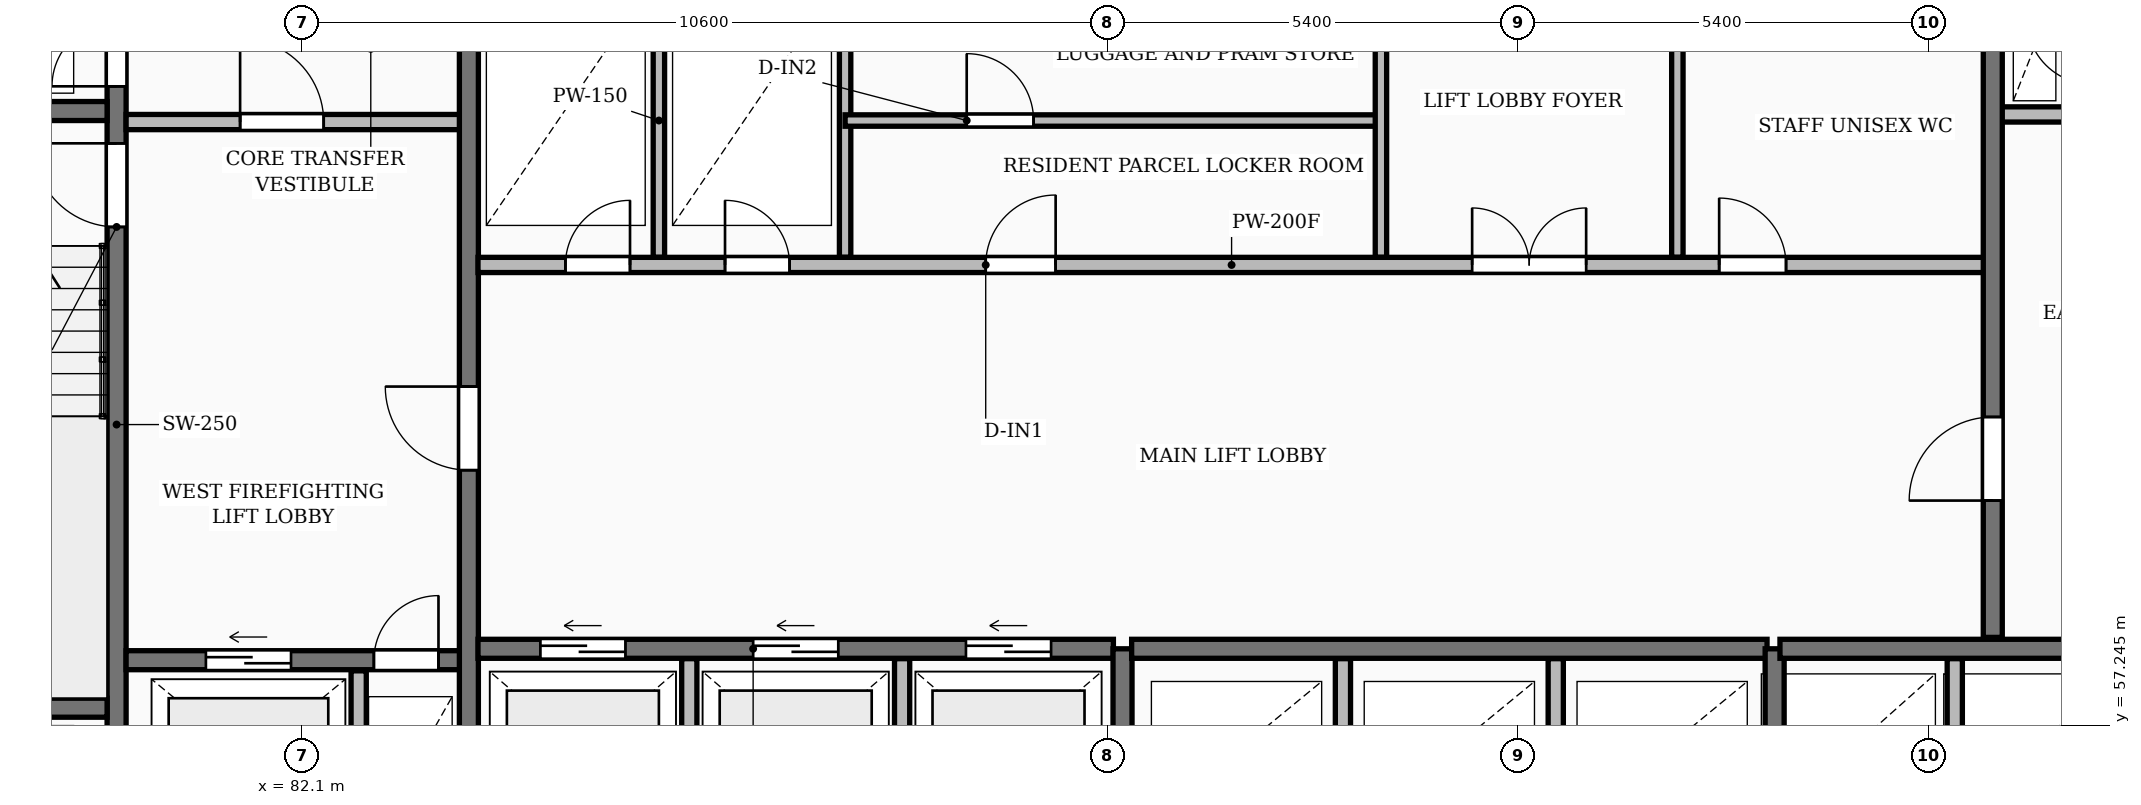
"""IFC4 building model, lengths in metres.
Left out: names, types, materials, properties, quantities, classifications, styles, units other than length and angle.
Written with IfcOpenShell. Run it as: python <this file> out.ifc"""

import sys

from ifc_helpers import new_model, si_unit, direction, frame, frame_2d, origin, place, context, subcontext, project, spatial, rectangle, extrude, element, fill, save


model = new_model("IFC4")
c1 = context("Model", 3, precision=1e-05, world=origin(), true_north=direction((0.0, 1.0)))
c2 = subcontext(c1, "Body", "Model", "MODEL_VIEW")
j1 = project(units=[si_unit("LENGTHUNIT", "METRE"), si_unit("PLANEANGLEUNIT", "RADIAN")], contexts=[c1])
p1 = place(None, origin())
s1 = spatial("IfcSite", under=j1, at=p1, CompositionType="ELEMENT")
p2 = place(p1, origin())
s2 = spatial("IfcBuilding", under=s1, at=p2, CompositionType="ELEMENT")
p3 = place(p2, frame((0.0, 0.0, 84.05)))
s3 = spatial("IfcBuildingStorey", under=s2, at=p3, CompositionType="ELEMENT", Elevation=84.05)
p4 = place(p3, frame((79.665, 55.4, 0.0), z_axis=(0.0, 0.0, 1.0), x_axis=(0.0, 1.0, 0.0)))
e1 = element("IfcWall", 1, at=p4, inside=s3, PredefinedType="SHEAR", context=c2, shape_type="SweptSolid", body=[
    extrude(rectangle(XDim=11.6, YDim=0.25, at=frame_2d((5.8, 0.0))), origin(), (0.0, 0.0, 1.0), 3.25),
])
p5 = place(p4, frame((0.55, 0.0, 0.0)))
e2 = element("IfcOpeningElement", 2, at=p5, cuts=e1, PredefinedType="OPENING", context=c2, shape_type="SweptSolid", body=[
    extrude(rectangle(XDim=0.85, YDim=2.05, at=frame_2d((0.425, 1.025))), frame((0.0, 0.135, 0.0), z_axis=(0.0, -1.0, 0.0), x_axis=(1.0, 0.0, 0.0)), (0.0, 0.0, 1.0), 0.27),
])
p6 = place(p4, frame((8.4, 0.0, 0.0)))
e3 = element("IfcOpeningElement", 3, at=p6, cuts=e1, PredefinedType="OPENING", context=c2, shape_type="SweptSolid", body=[
    extrude(rectangle(XDim=1.1, YDim=2.1, at=frame_2d((0.55, 1.05))), frame((0.0, 0.135, 0.0), z_axis=(0.0, -1.0, 0.0), x_axis=(1.0, 0.0, 0.0)), (0.0, 0.0, 1.0), 0.27),
])
p7 = place(p4, frame((10.25, 0.0, 0.0)))
e4 = element("IfcOpeningElement", 4, at=p7, cuts=e1, PredefinedType="OPENING", context=c2, shape_type="SweptSolid", body=[
    extrude(rectangle(XDim=0.85, YDim=2.05, at=frame_2d((0.425, 1.025))), frame((0.0, 0.135, 0.0), z_axis=(0.0, -1.0, 0.0), x_axis=(1.0, 0.0, 0.0)), (0.0, 0.0, 1.0), 0.27),
])
for number, where, z_axis, x_axis in (
    (5, (76.3, 57.475, 0.0), (0.0, 0.0, 1.0), (1.0, 0.0, 0.0)),
    (6, (76.3, 65.325, 0.0), (0.0, 0.0, 1.0), (1.0, 0.0, 0.0)),
):
    element("IfcWall", number, at=place(p3, frame(where, z_axis=z_axis, x_axis=x_axis)), inside=s3, PredefinedType="SHEAR", context=c2, shape_type="SweptSolid", body=[
        extrude(rectangle(XDim=3.24, YDim=0.25, at=frame_2d((1.62, 0.0))), origin(), (0.0, 0.0, 1.0), 3.25),
    ])
p8 = place(p3, frame((79.79, 58.1, 0.0), z_axis=(0.0, 0.0, 1.0), x_axis=(1.0, 0.0, 0.0)))
e7 = element("IfcWall", 7, at=p8, inside=s3, PredefinedType="SHEAR", context=c2, shape_type="SweptSolid", body=[
    extrude(rectangle(XDim=4.39, YDim=0.25, at=frame_2d((2.195, 0.0))), origin(), (0.0, 0.0, 1.0), 3.25),
])
p9 = place(p8, frame((1.05, 0.0, 0.0)))
e8 = element("IfcOpeningElement", 8, at=p9, cuts=e7, PredefinedType="OPENING", context=c2, shape_type="SweptSolid", body=[
    extrude(rectangle(XDim=1.12, YDim=2.12, at=frame_2d((0.56, 1.06))), frame((0.0, 0.135, 0.0), z_axis=(0.0, -1.0, 0.0), x_axis=(1.0, 0.0, 0.0)), (0.0, 0.0, 1.0), 0.27),
])
p10 = place(p8, frame((3.26, 0.0, 0.0)))
e9 = element("IfcOpeningElement", 9, at=p10, cuts=e7, PredefinedType="OPENING", context=c2, shape_type="SweptSolid", body=[
    extrude(rectangle(XDim=0.85, YDim=2.05, at=frame_2d((0.425, 1.025))), frame((0.0, 0.135, 0.0), z_axis=(0.0, -1.0, 0.0), x_axis=(1.0, 0.0, 0.0)), (0.0, 0.0, 1.0), 0.27),
])
p11 = place(p3, frame((82.85, 55.4, 0.0), z_axis=(0.0, 0.0, 1.0), x_axis=(0.0, 1.0, 0.0)))
e10 = element("IfcWall", 10, at=p11, inside=s3, PredefinedType="PARTITIONING", context=c2, shape_type="SweptSolid", body=[
    extrude(rectangle(XDim=2.56, YDim=0.2, at=frame_2d((1.28, 0.0))), origin(), (0.0, 0.0, 1.0), 2.97),
])
p12 = place(p3, frame((79.79, 65.18, 0.0), z_axis=(0.0, 0.0, 1.0), x_axis=(1.0, 0.0, 0.0)))
e11 = element("IfcWall", 11, at=p12, inside=s3, PredefinedType="PARTITIONING", context=c2, shape_type="SweptSolid", body=[
    extrude(rectangle(XDim=4.39, YDim=0.2, at=frame_2d((2.195, 0.0))), origin(), (0.0, 0.0, 1.0), 2.97),
])
p13 = place(p12, frame((1.5, 0.0, 0.0)))
e12 = element("IfcOpeningElement", 12, at=p13, cuts=e11, PredefinedType="OPENING", context=c2, shape_type="SweptSolid", body=[
    extrude(rectangle(XDim=1.1, YDim=2.1, at=frame_2d((0.55, 1.05))), frame((0.0, 0.11, 0.0), z_axis=(0.0, -1.0, 0.0), x_axis=(1.0, 0.0, 0.0)), (0.0, 0.0, 1.0), 0.22),
])
p14 = place(p3, frame((84.3, 55.4, 0.0), z_axis=(0.0, 0.0, 1.0), x_axis=(0.0, 1.0, 0.0)))
e13 = element("IfcWall", 13, at=p14, inside=s3, PredefinedType="SHEAR", context=c2, shape_type="SweptSolid", body=[
    extrude(rectangle(XDim=11.6, YDim=0.25, at=frame_2d((5.8, 0.0))), origin(), (0.0, 0.0, 1.0), 3.25),
])
p15 = place(p14, frame((5.2, 0.0, 0.0)))
e14 = element("IfcOpeningElement", 14, at=p15, cuts=e13, PredefinedType="OPENING", context=c2, shape_type="SweptSolid", body=[
    extrude(rectangle(XDim=1.1, YDim=2.1, at=frame_2d((0.55, 1.05))), frame((0.0, 0.135, 0.0), z_axis=(0.0, -1.0, 0.0), x_axis=(1.0, 0.0, 0.0)), (0.0, 0.0, 1.0), 0.27),
])
for number, where, z_axis, x_axis in (
    (15, (87.2, 55.4, 0.0), (0.0, 0.0, 1.0), (0.0, 1.0, 0.0)),
    (16, (90.0, 55.4, 0.0), (0.0, 0.0, 1.0), (0.0, 1.0, 0.0)),
):
    element("IfcWall", number, at=place(p3, frame(where, z_axis=z_axis, x_axis=x_axis)), inside=s3, PredefinedType="PARTITIONING", context=c2, shape_type="SweptSolid", body=[
        extrude(rectangle(XDim=2.72, YDim=0.2, at=frame_2d((1.36, 0.0))), origin(), (0.0, 0.0, 1.0), 2.97),
    ])
p16 = place(p3, frame((84.42, 58.25, 0.0), z_axis=(0.0, 0.0, 1.0), x_axis=(1.0, 0.0, 0.0)))
e17 = element("IfcWall", 17, at=p16, inside=s3, PredefinedType="SHEAR", context=c2, shape_type="SweptSolid", body=[
    extrude(rectangle(XDim=8.36, YDim=0.25, at=frame_2d((4.18, 0.0))), origin(), (0.0, 0.0, 1.0), 3.25),
])
p17 = place(p16, frame((0.82, 0.0, 0.0)))
e18 = element("IfcOpeningElement", 18, at=p17, cuts=e17, PredefinedType="OPENING", context=c2, shape_type="SweptSolid", body=[
    extrude(rectangle(XDim=1.12, YDim=2.12, at=frame_2d((0.56, 1.06))), frame((0.0, 0.135, 0.0), z_axis=(0.0, -1.0, 0.0), x_axis=(1.0, 0.0, 0.0)), (0.0, 0.0, 1.0), 0.27),
])
p18 = place(p16, frame((3.62, 0.0, 0.0)))
e19 = element("IfcOpeningElement", 19, at=p18, cuts=e17, PredefinedType="OPENING", context=c2, shape_type="SweptSolid", body=[
    extrude(rectangle(XDim=1.12, YDim=2.12, at=frame_2d((0.56, 1.06))), frame((0.0, 0.135, 0.0), z_axis=(0.0, -1.0, 0.0), x_axis=(1.0, 0.0, 0.0)), (0.0, 0.0, 1.0), 0.27),
])
p19 = place(p16, frame((6.42, 0.0, 0.0)))
e20 = element("IfcOpeningElement", 20, at=p19, cuts=e17, PredefinedType="OPENING", context=c2, shape_type="SweptSolid", body=[
    extrude(rectangle(XDim=1.12, YDim=2.12, at=frame_2d((0.56, 1.06))), frame((0.0, 0.135, 0.0), z_axis=(0.0, -1.0, 0.0), x_axis=(1.0, 0.0, 0.0)), (0.0, 0.0, 1.0), 0.27),
])
p20 = place(p3, frame((92.9, 55.4, 0.0), z_axis=(0.0, 0.0, 1.0), x_axis=(0.0, 1.0, 0.0)))
e21 = element("IfcWall", 21, at=p20, inside=s3, PredefinedType="SHEAR", context=c2, shape_type="SweptSolid", body=[
    extrude(rectangle(XDim=2.85, YDim=0.25, at=frame_2d((1.425, 0.0))), origin(), (0.0, 0.0, 1.0), 3.25),
])
for number, where, z_axis, x_axis in (
    (22, (95.8, 55.4, 0.0), (0.0, 0.0, 1.0), (0.0, 1.0, 0.0)),
    (23, (98.6, 55.4, 0.0), (0.0, 0.0, 1.0), (0.0, 1.0, 0.0)),
):
    element("IfcWall", number, at=place(p3, frame(where, z_axis=z_axis, x_axis=x_axis)), inside=s3, PredefinedType="PARTITIONING", context=c2, shape_type="SweptSolid", body=[
        extrude(rectangle(XDim=2.72, YDim=0.2, at=frame_2d((1.36, 0.0))), origin(), (0.0, 0.0, 1.0), 2.97),
    ])
p21 = place(p3, frame((93.02, 58.25, 0.0), z_axis=(0.0, 0.0, 1.0), x_axis=(1.0, 0.0, 0.0)))
e24 = element("IfcWall", 24, at=p21, inside=s3, PredefinedType="SHEAR", context=c2, shape_type="SweptSolid", body=[
    extrude(rectangle(XDim=8.36, YDim=0.25, at=frame_2d((4.18, 0.0))), origin(), (0.0, 0.0, 1.0), 3.25),
])
p22 = place(p3, frame((101.48, 55.4, 0.0), z_axis=(0.0, 0.0, 1.0), x_axis=(0.0, 1.0, 0.0)))
e25 = element("IfcWall", 25, at=p22, inside=s3, PredefinedType="SHEAR", context=c2, shape_type="SweptSolid", body=[
    extrude(rectangle(XDim=2.85, YDim=0.25, at=frame_2d((1.425, 0.0))), origin(), (0.0, 0.0, 1.0), 3.25),
])
p23 = place(p3, frame((103.85, 55.4, 0.0), z_axis=(0.0, 0.0, 1.0), x_axis=(0.0, 1.0, 0.0)))
e26 = element("IfcWall", 26, at=p23, inside=s3, PredefinedType="PARTITIONING", context=c2, shape_type="SweptSolid", body=[
    extrude(rectangle(XDim=2.72, YDim=0.2, at=frame_2d((1.36, 0.0))), origin(), (0.0, 0.0, 1.0), 2.97),
])
p24 = place(p3, frame((101.55, 58.25, 0.0), z_axis=(0.0, 0.0, 1.0), x_axis=(1.0, 0.0, 0.0)))
e27 = element("IfcWall", 27, at=p24, inside=s3, PredefinedType="SHEAR", context=c2, shape_type="SweptSolid", body=[
    extrude(rectangle(XDim=4.6, YDim=0.25, at=frame_2d((2.3, 0.0))), origin(), (0.0, 0.0, 1.0), 3.25),
])
for number, where, z_axis, x_axis in (
    (28, (86.8, 63.4, 0.0), (0.0, 0.0, 1.0), (0.0, 1.0, 0.0)),
    (29, (89.25, 63.4, 0.0), (0.0, 0.0, 1.0), (0.0, 1.0, 0.0)),
):
    element("IfcWall", number, at=place(p3, frame(where, z_axis=z_axis, x_axis=x_axis)), inside=s3, PredefinedType="PARTITIONING", context=c2, shape_type="SweptSolid", body=[
        extrude(rectangle(XDim=3.6, YDim=0.15, at=frame_2d((1.8, 0.0))), origin(), (0.0, 0.0, 1.0), 2.97),
    ])
p25 = place(p3, frame((89.25, 65.2, 0.0), z_axis=(0.0, 0.0, 1.0), x_axis=(1.0, 0.0, 0.0)))
e30 = element("IfcWall", 30, at=p25, inside=s3, PredefinedType="PARTITIONING", context=c2, shape_type="SweptSolid", body=[
    extrude(rectangle(XDim=7.05, YDim=0.15, at=frame_2d((3.525, 0.0))), origin(), (0.0, 0.0, 1.0), 2.97),
])
p26 = place(p25, frame((1.6, 0.0, 0.0)))
e31 = element("IfcOpeningElement", 31, at=p26, cuts=e30, PredefinedType="OPENING", context=c2, shape_type="SweptSolid", body=[
    extrude(rectangle(XDim=0.88, YDim=2.06, at=frame_2d((0.44, 1.03))), frame((0.0, 0.085, 0.0), z_axis=(0.0, -1.0, 0.0), x_axis=(1.0, 0.0, 0.0)), (0.0, 0.0, 1.0), 0.17),
])
for number, where, z_axis, x_axis in (
    (32, (96.3, 63.4, 0.0), (0.0, 0.0, 1.0), (0.0, 1.0, 0.0)),
    (33, (100.2, 63.4, 0.0), (0.0, 0.0, 1.0), (0.0, 1.0, 0.0)),
):
    element("IfcWall", number, at=place(p3, frame(where, z_axis=z_axis, x_axis=x_axis)), inside=s3, PredefinedType="PARTITIONING", context=c2, shape_type="SweptSolid", body=[
        extrude(rectangle(XDim=3.6, YDim=0.15, at=frame_2d((1.8, 0.0))), origin(), (0.0, 0.0, 1.0), 2.97),
    ])
p27 = place(p3, frame((84.42, 63.3, 0.0), z_axis=(0.0, 0.0, 1.0), x_axis=(1.0, 0.0, 0.0)))
e34 = element("IfcWall", 34, at=p27, inside=s3, PredefinedType="PARTITIONING", context=c2, shape_type="SweptSolid", body=[
    extrude(rectangle(XDim=19.83, YDim=0.2, at=frame_2d((9.915, 0.0))), origin(), (0.0, 0.0, 1.0), 2.97),
])
p28 = place(p27, frame((1.15, 0.0, 0.0)))
e35 = element("IfcOpeningElement", 35, at=p28, cuts=e34, PredefinedType="OPENING", context=c2, shape_type="SweptSolid", body=[
    extrude(rectangle(XDim=0.85, YDim=2.05, at=frame_2d((0.425, 1.025))), frame((0.0, 0.11, 0.0), z_axis=(0.0, -1.0, 0.0), x_axis=(1.0, 0.0, 0.0)), (0.0, 0.0, 1.0), 0.22),
])
p29 = place(p27, frame((3.25, 0.0, 0.0)))
e36 = element("IfcOpeningElement", 36, at=p29, cuts=e34, PredefinedType="OPENING", context=c2, shape_type="SweptSolid", body=[
    extrude(rectangle(XDim=0.85, YDim=2.05, at=frame_2d((0.425, 1.025))), frame((0.0, 0.11, 0.0), z_axis=(0.0, -1.0, 0.0), x_axis=(1.0, 0.0, 0.0)), (0.0, 0.0, 1.0), 0.22),
])
p30 = place(p27, frame((13.08, 0.0, 0.0)))
e37 = element("IfcOpeningElement", 37, at=p30, cuts=e34, PredefinedType="OPENING", context=c2, shape_type="SweptSolid", body=[
    extrude(rectangle(XDim=1.5, YDim=2.2, at=frame_2d((0.75, 1.1))), frame((0.0, 0.11, 0.0), z_axis=(0.0, -1.0, 0.0), x_axis=(1.0, 0.0, 0.0)), (0.0, 0.0, 1.0), 0.22),
])
p31 = place(p27, frame((6.68, 0.0, 0.0)))
e38 = element("IfcOpeningElement", 38, at=p31, cuts=e34, PredefinedType="OPENING", context=c2, shape_type="SweptSolid", body=[
    extrude(rectangle(XDim=0.92, YDim=2.08, at=frame_2d((0.46, 1.04))), frame((0.0, 0.11, 0.0), z_axis=(0.0, -1.0, 0.0), x_axis=(1.0, 0.0, 0.0)), (0.0, 0.0, 1.0), 0.22),
])
p32 = place(p27, frame((16.33, 0.0, 0.0)))
e39 = element("IfcOpeningElement", 39, at=p32, cuts=e34, PredefinedType="OPENING", context=c2, shape_type="SweptSolid", body=[
    extrude(rectangle(XDim=0.88, YDim=2.06, at=frame_2d((0.44, 1.03))), frame((0.0, 0.11, 0.0), z_axis=(0.0, -1.0, 0.0), x_axis=(1.0, 0.0, 0.0)), (0.0, 0.0, 1.0), 0.22),
])
p33 = place(p3, frame((104.45, 65.28, 0.0), z_axis=(0.0, 0.0, 1.0), x_axis=(1.0, 0.0, 0.0)))
e40 = element("IfcWall", 40, at=p33, inside=s3, PredefinedType="PARTITIONING", context=c2, shape_type="SweptSolid", body=[
    extrude(rectangle(XDim=1.2, YDim=0.2, at=frame_2d((0.6, 0.0))), origin(), (0.0, 0.0, 1.0), 2.97),
])
p34 = place(p3, frame((104.35, 58.4, 0.0), z_axis=(0.0, 0.0, 1.0), x_axis=(0.0, 1.0, 0.0)))
e41 = element("IfcWall", 41, at=p34, inside=s3, PredefinedType="SHEAR", context=c2, shape_type="SweptSolid", body=[
    extrude(rectangle(XDim=8.6, YDim=0.25, at=frame_2d((4.3, 0.0))), origin(), (0.0, 0.0, 1.0), 3.25),
])
p35 = place(p34, frame((1.8, 0.0, 0.0)))
e42 = element("IfcOpeningElement", 42, at=p35, cuts=e41, PredefinedType="OPENING", context=c2, shape_type="SweptSolid", body=[
    extrude(rectangle(XDim=1.1, YDim=2.1, at=frame_2d((0.55, 1.05))), frame((0.0, 0.135, 0.0), z_axis=(0.0, -1.0, 0.0), x_axis=(1.0, 0.0, 0.0)), (0.0, 0.0, 1.0), 0.27),
])
p36 = place(p6, origin())
e43 = element("IfcDoor", 43, at=p36, inside=s3, OperationType="SINGLE_SWING_RIGHT", PredefinedType="DOOR", context=c2, shape_type="SweptSolid", body=[
    extrude(rectangle(XDim=1.1, YDim=2.1, at=frame_2d((0.55, 1.05))), frame((0.0, 0.025, 0.0), z_axis=(0.0, -1.0, 0.0), x_axis=(1.0, 0.0, 0.0)), (0.0, 0.0, 1.0), 0.05),
])
fill(e3, e43)
p37 = place(p7, origin())
e44 = element("IfcDoor", 44, at=p37, inside=s3, OperationType="SINGLE_SWING_LEFT", PredefinedType="DOOR", context=c2, shape_type="SweptSolid", body=[
    extrude(rectangle(XDim=0.85, YDim=2.05, at=frame_2d((0.425, 1.025))), frame((0.0, 0.025, 0.0), z_axis=(0.0, -1.0, 0.0), x_axis=(1.0, 0.0, 0.0)), (0.0, 0.0, 1.0), 0.05),
])
fill(e4, e44)
p38 = place(p9, origin())
e45 = element("IfcDoor", 45, at=p38, inside=s3, OperationType="SLIDING_TO_LEFT", PredefinedType="DOOR", context=c2, shape_type="SweptSolid", body=[
    extrude(rectangle(XDim=1.12, YDim=2.12, at=frame_2d((0.56, 1.06))), frame((0.0, 0.025, 0.0), z_axis=(0.0, -1.0, 0.0), x_axis=(1.0, 0.0, 0.0)), (0.0, 0.0, 1.0), 0.05),
])
fill(e8, e45)
p39 = place(p10, origin())
e46 = element("IfcDoor", 46, at=p39, inside=s3, OperationType="SINGLE_SWING_RIGHT", PredefinedType="DOOR", context=c2, shape_type="SweptSolid", body=[
    extrude(rectangle(XDim=0.85, YDim=2.05, at=frame_2d((0.425, 1.025))), frame((0.0, 0.025, 0.0), z_axis=(0.0, -1.0, 0.0), x_axis=(1.0, 0.0, 0.0)), (0.0, 0.0, 1.0), 0.05),
])
fill(e9, e46)
p40 = place(p13, origin())
e47 = element("IfcDoor", 47, at=p40, inside=s3, OperationType="SINGLE_SWING_LEFT", PredefinedType="DOOR", context=c2, shape_type="SweptSolid", body=[
    extrude(rectangle(XDim=1.1, YDim=2.1, at=frame_2d((0.55, 1.05))), frame((0.0, 0.025, 0.0), z_axis=(0.0, -1.0, 0.0), x_axis=(1.0, 0.0, 0.0)), (0.0, 0.0, 1.0), 0.05),
])
fill(e12, e47)
p41 = place(p15, origin())
e48 = element("IfcDoor", 48, at=p41, inside=s3, OperationType="SINGLE_SWING_RIGHT", PredefinedType="DOOR", context=c2, shape_type="SweptSolid", body=[
    extrude(rectangle(XDim=1.1, YDim=2.1, at=frame_2d((0.55, 1.05))), frame((0.0, 0.025, 0.0), z_axis=(0.0, -1.0, 0.0), x_axis=(1.0, 0.0, 0.0)), (0.0, 0.0, 1.0), 0.05),
])
fill(e14, e48)
p42 = place(p17, origin())
e49 = element("IfcDoor", 49, at=p42, inside=s3, OperationType="SLIDING_TO_LEFT", PredefinedType="DOOR", context=c2, shape_type="SweptSolid", body=[
    extrude(rectangle(XDim=1.12, YDim=2.12, at=frame_2d((0.56, 1.06))), frame((0.0, 0.025, 0.0), z_axis=(0.0, -1.0, 0.0), x_axis=(1.0, 0.0, 0.0)), (0.0, 0.0, 1.0), 0.05),
])
fill(e18, e49)
p43 = place(p18, origin())
e50 = element("IfcDoor", 50, at=p43, inside=s3, OperationType="SLIDING_TO_LEFT", PredefinedType="DOOR", context=c2, shape_type="SweptSolid", body=[
    extrude(rectangle(XDim=1.12, YDim=2.12, at=frame_2d((0.56, 1.06))), frame((0.0, 0.025, 0.0), z_axis=(0.0, -1.0, 0.0), x_axis=(1.0, 0.0, 0.0)), (0.0, 0.0, 1.0), 0.05),
])
fill(e19, e50)
p44 = place(p19, origin())
e51 = element("IfcDoor", 51, at=p44, inside=s3, OperationType="SLIDING_TO_LEFT", PredefinedType="DOOR", context=c2, shape_type="SweptSolid", body=[
    extrude(rectangle(XDim=1.12, YDim=2.12, at=frame_2d((0.56, 1.06))), frame((0.0, 0.025, 0.0), z_axis=(0.0, -1.0, 0.0), x_axis=(1.0, 0.0, 0.0)), (0.0, 0.0, 1.0), 0.05),
])
fill(e20, e51)
p45 = place(p26, origin())
e52 = element("IfcDoor", 52, at=p45, inside=s3, OperationType="SINGLE_SWING_LEFT", PredefinedType="DOOR", context=c2, shape_type="SweptSolid", body=[
    extrude(rectangle(XDim=0.88, YDim=2.06, at=frame_2d((0.44, 1.03))), frame((0.0, 0.025, 0.0), z_axis=(0.0, -1.0, 0.0), x_axis=(1.0, 0.0, 0.0)), (0.0, 0.0, 1.0), 0.05),
])
fill(e31, e52)
p46 = place(p28, origin())
e53 = element("IfcDoor", 53, at=p46, inside=s3, OperationType="SINGLE_SWING_RIGHT", PredefinedType="DOOR", context=c2, shape_type="SweptSolid", body=[
    extrude(rectangle(XDim=0.85, YDim=2.05, at=frame_2d((0.425, 1.025))), frame((0.0, 0.025, 0.0), z_axis=(0.0, -1.0, 0.0), x_axis=(1.0, 0.0, 0.0)), (0.0, 0.0, 1.0), 0.05),
])
fill(e35, e53)
p47 = place(p29, origin())
e54 = element("IfcDoor", 54, at=p47, inside=s3, OperationType="SINGLE_SWING_LEFT", PredefinedType="DOOR", context=c2, shape_type="SweptSolid", body=[
    extrude(rectangle(XDim=0.85, YDim=2.05, at=frame_2d((0.425, 1.025))), frame((0.0, 0.025, 0.0), z_axis=(0.0, -1.0, 0.0), x_axis=(1.0, 0.0, 0.0)), (0.0, 0.0, 1.0), 0.05),
])
fill(e36, e54)
p48 = place(p30, origin())
e55 = element("IfcDoor", 55, at=p48, inside=s3, OperationType="DOUBLE_DOOR_SINGLE_SWING", PredefinedType="DOOR", context=c2, shape_type="SweptSolid", body=[
    extrude(rectangle(XDim=1.5, YDim=2.2, at=frame_2d((0.75, 1.1))), frame((0.0, 0.025, 0.0), z_axis=(0.0, -1.0, 0.0), x_axis=(1.0, 0.0, 0.0)), (0.0, 0.0, 1.0), 0.05),
])
fill(e37, e55)
p49 = place(p31, origin())
e56 = element("IfcDoor", 56, at=p49, inside=s3, OperationType="SINGLE_SWING_RIGHT", PredefinedType="DOOR", context=c2, shape_type="SweptSolid", body=[
    extrude(rectangle(XDim=0.92, YDim=2.08, at=frame_2d((0.46, 1.04))), frame((0.0, 0.025, 0.0), z_axis=(0.0, -1.0, 0.0), x_axis=(1.0, 0.0, 0.0)), (0.0, 0.0, 1.0), 0.05),
])
fill(e38, e56)
p50 = place(p32, origin())
e57 = element("IfcDoor", 57, at=p50, inside=s3, OperationType="SINGLE_SWING_LEFT", PredefinedType="DOOR", context=c2, shape_type="SweptSolid", body=[
    extrude(rectangle(XDim=0.88, YDim=2.06, at=frame_2d((0.44, 1.03))), frame((0.0, 0.025, 0.0), z_axis=(0.0, -1.0, 0.0), x_axis=(1.0, 0.0, 0.0)), (0.0, 0.0, 1.0), 0.05),
])
fill(e39, e57)
p51 = place(p35, origin())
e58 = element("IfcDoor", 58, at=p51, inside=s3, OperationType="SINGLE_SWING_LEFT", PredefinedType="DOOR", context=c2, shape_type="SweptSolid", body=[
    extrude(rectangle(XDim=1.1, YDim=2.1, at=frame_2d((0.55, 1.05))), frame((0.0, 0.025, 0.0), z_axis=(0.0, -1.0, 0.0), x_axis=(1.0, 0.0, 0.0)), (0.0, 0.0, 1.0), 0.05),
])
fill(e42, e58)
save(model, sys.argv[1])
